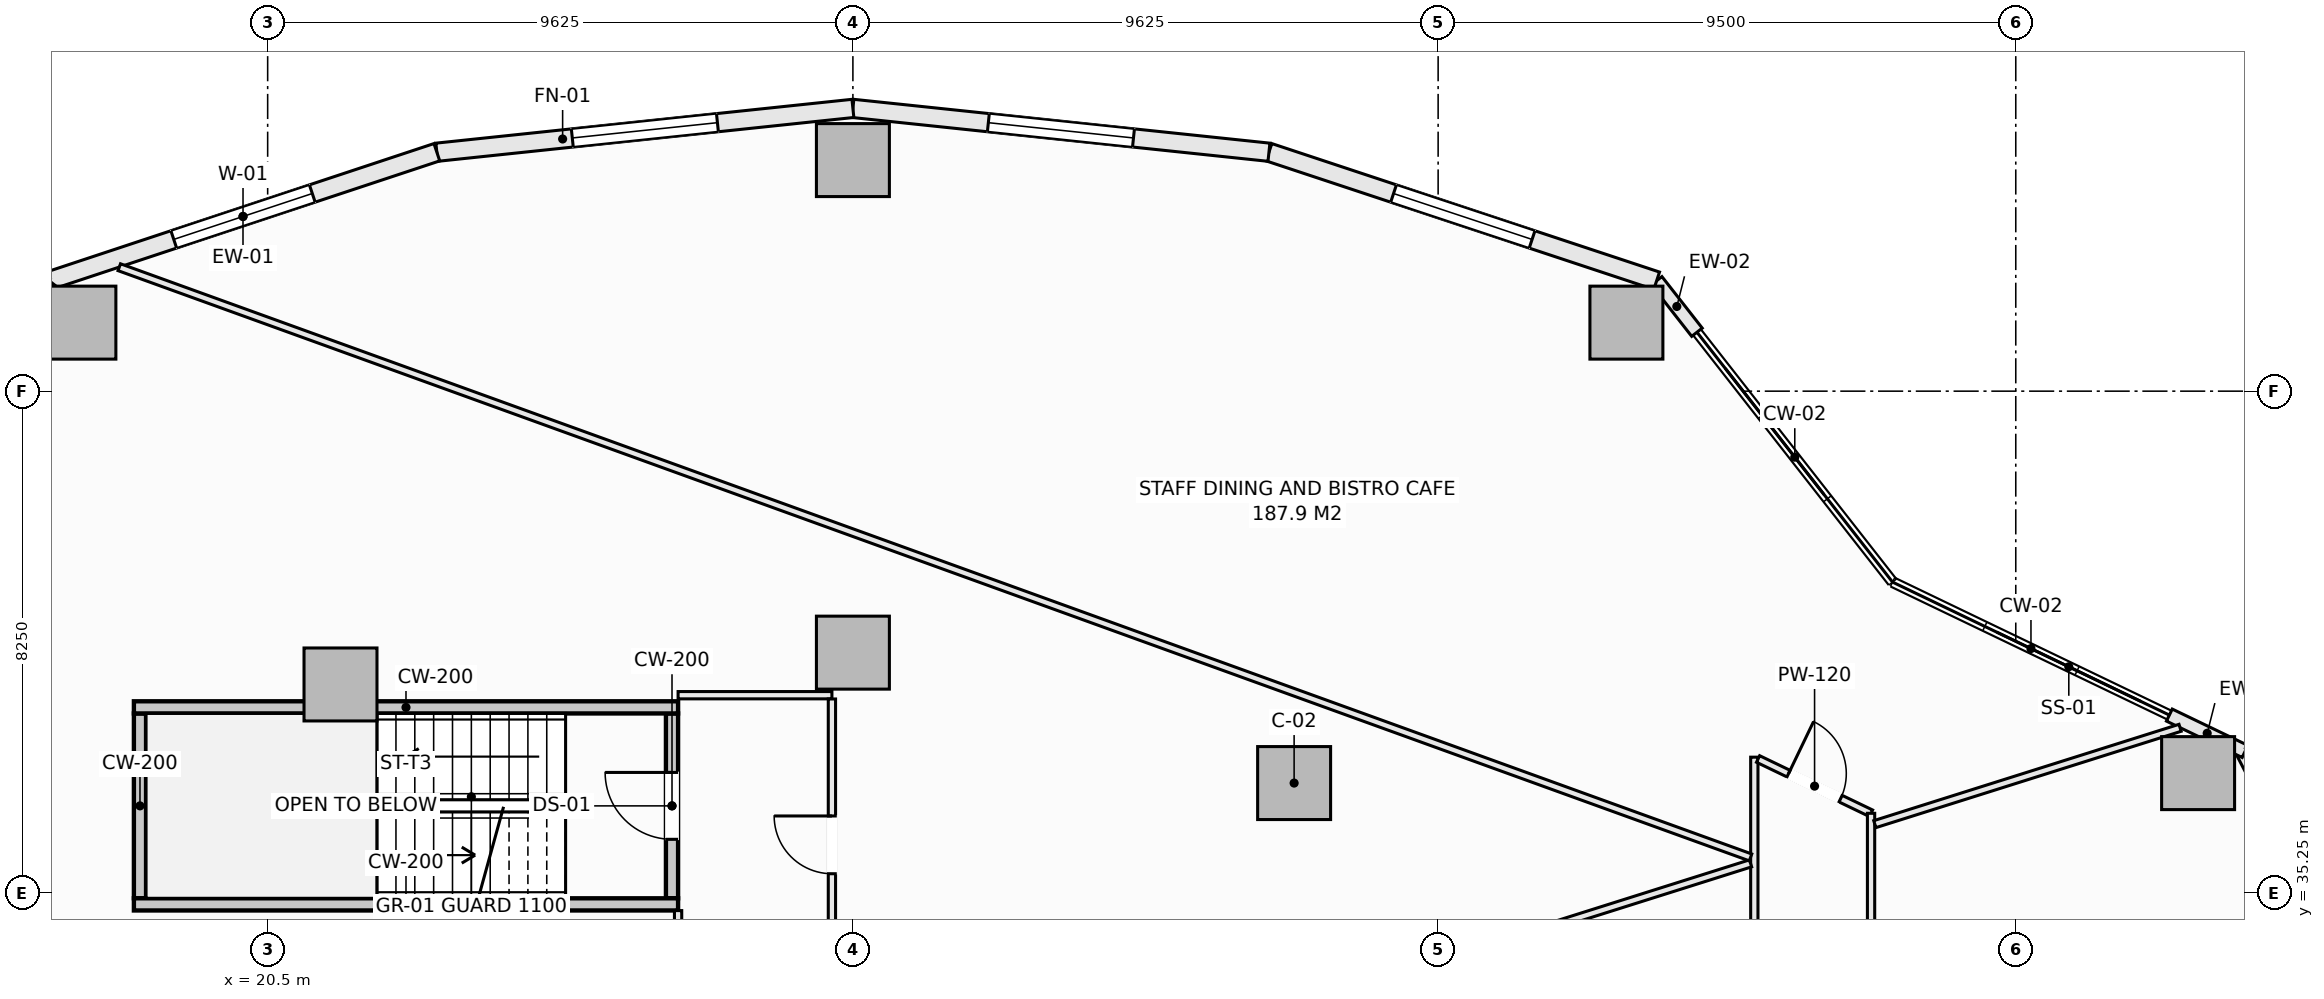
"""IFC4 building model, lengths in metres.
Left out: names, types, materials, properties, quantities, classifications, styles, units other than length and angle.
Written with IfcOpenShell. Run it as: python <this file> out.ifc"""

import sys

from ifc_helpers import new_model, si_unit, direction, frame, frame_2d, origin, origin_2d, place, context, subcontext, project, spatial, rectangle, extrude, element, fill, save


model = new_model("IFC4")
c1 = context("Model", 3, precision=1e-05, world=origin(), true_north=direction((0.0, 1.0)))
c2 = subcontext(c1, "Body", "Model", "MODEL_VIEW")
j1 = project(units=[si_unit("LENGTHUNIT", "METRE"), si_unit("PLANEANGLEUNIT", "RADIAN")], contexts=[c1])
p1 = place(None, origin())
s1 = spatial("IfcSite", under=j1, at=p1, CompositionType="ELEMENT")
p2 = place(p1, origin())
s2 = spatial("IfcBuilding", under=s1, at=p2, CompositionType="ELEMENT")
p3 = place(p2, frame((0.0, 0.0, 76.55)))
s3 = spatial("IfcBuildingStorey", under=s2, at=p3, CompositionType="ELEMENT", Elevation=76.55)
for number, where, z_axis, x_axis in (
    (1, (52.249, 37.219, -0.28), (0.0, 0.0, 1.0), (1.0, 0.0, 0.0)),
    (2, (42.846, 44.627, -0.28), (0.0, 0.0, 1.0), (1.0, 0.0, 0.0)),
    (3, (30.125, 47.3, -0.28), (0.0, 0.0, 1.0), (1.0, 0.0, 0.0)),
    (4, (17.404, 44.627, -0.28), (0.0, 0.0, 1.0), (1.0, 0.0, 0.0)),
    (5, (37.382, 37.055, -0.28), (0.0, 0.0, 1.0), (1.0, 0.0, 0.0)),
    (6, (30.125, 39.2, -0.28), (0.0, 0.0, 1.0), (1.0, 0.0, 0.0)),
    (7, (21.698, 38.677, -0.28), (0.0, 0.0, 1.0), (1.0, 0.0, 0.0)),
):
    element("IfcColumn", number, at=place(p3, frame(where, z_axis=z_axis, x_axis=x_axis)), inside=s3, PredefinedType="COLUMN", context=c2, shape_type="SweptSolid", body=[
        extrude(rectangle(XDim=1.2, YDim=1.2, at=origin_2d()), origin(), (0.0, 0.0, 1.0), 3.85),
    ])
p4 = place(p3, frame((53.021, 37.575, 0.0), z_axis=(0.0, 0.0, 1.0), x_axis=(0.459800981414, -0.888021991558, 0.0)))
e8 = element("IfcWall", 8, at=p4, inside=s3, PredefinedType="SOLIDWALL", context=c2, shape_type="SweptSolid", body=[
    extrude(rectangle(XDim=5.744, YDim=0.3, at=frame_2d((2.872, 0.0))), origin(), (0.0, 0.0, 1.0), 3.093),
])
p5 = place(p4, frame((1.672, 0.0, 0.85)))
e9 = element("IfcOpeningElement", 9, at=p5, cuts=e8, PredefinedType="OPENING", context=c2, shape_type="SweptSolid", body=[
    extrude(rectangle(XDim=2.4, YDim=1.9, at=frame_2d((1.2, 0.95))), frame((0.0, 0.16, 0.0), z_axis=(0.0, -1.0, 0.0), x_axis=(1.0, 0.0, 0.0)), (0.0, 0.0, 1.0), 0.32),
])
p6 = place(p3, frame((51.776, 38.173, 0.0), z_axis=(0.0, 0.0, 1.0), x_axis=(0.90131879969, -0.433156347438, 0.0)))
e10 = element("IfcWall", 10, at=p6, inside=s3, PredefinedType="SOLIDWALL", context=c2, shape_type="SweptSolid", body=[
    extrude(rectangle(XDim=1.381, YDim=0.22, at=frame_2d((0.69, 0.0))), origin(), (0.0, 0.0, 1.0), 3.093),
])
p7 = place(p3, frame((43.344, 45.316, 0.0), z_axis=(0.0, 0.0, 1.0), x_axis=(0.616387780378, -0.787442762492, 0.0)))
e11 = element("IfcWall", 11, at=p7, inside=s3, PredefinedType="SOLIDWALL", context=c2, shape_type="SweptSolid", body=[
    extrude(rectangle(XDim=1.076, YDim=0.22, at=frame_2d((0.538, 0.0))), origin(), (0.0, 0.0, 1.0), 3.093),
])
p8 = place(p3, frame((36.968, 47.429, 0.0), z_axis=(0.0, 0.0, 1.0), x_axis=(0.949245153629, -0.314537181127, 0.0)))
e12 = element("IfcWall", 12, at=p8, inside=s3, PredefinedType="SOLIDWALL", context=c2, shape_type="SweptSolid", body=[
    extrude(rectangle(XDim=6.717, YDim=0.3, at=frame_2d((3.358, 0.0))), origin(), (0.0, 0.0, 1.0), 3.093),
])
p9 = place(p8, frame((2.159, 0.0, 0.85)))
e13 = element("IfcOpeningElement", 13, at=p9, cuts=e12, PredefinedType="OPENING", context=c2, shape_type="SweptSolid", body=[
    extrude(rectangle(XDim=2.4, YDim=1.9, at=frame_2d((1.2, 0.95))), frame((0.0, 0.16, 0.0), z_axis=(0.0, -1.0, 0.0), x_axis=(1.0, 0.0, 0.0)), (0.0, 0.0, 1.0), 0.32),
])
p10 = place(p3, frame((30.125, 48.15, 0.0), z_axis=(0.0, 0.0, 1.0), x_axis=(0.994498840295, -0.104747585419, 0.0)))
e14 = element("IfcWall", 14, at=p10, inside=s3, PredefinedType="SOLIDWALL", context=c2, shape_type="SweptSolid", body=[
    extrude(rectangle(XDim=6.88, YDim=0.3, at=frame_2d((3.44, 0.0))), origin(), (0.0, 0.0, 1.0), 3.093),
])
p11 = place(p10, frame((2.24, 0.0, 0.85)))
e15 = element("IfcOpeningElement", 15, at=p11, cuts=e14, PredefinedType="OPENING", context=c2, shape_type="SweptSolid", body=[
    extrude(rectangle(XDim=2.4, YDim=1.9, at=frame_2d((1.2, 0.95))), frame((0.0, 0.16, 0.0), z_axis=(0.0, -1.0, 0.0), x_axis=(1.0, 0.0, 0.0)), (0.0, 0.0, 1.0), 0.32),
])
p12 = place(p3, frame((23.282, 47.429, 0.0), z_axis=(0.0, 0.0, 1.0), x_axis=(0.994498840295, 0.104747585419, 0.0)))
e16 = element("IfcWall", 16, at=p12, inside=s3, PredefinedType="SOLIDWALL", context=c2, shape_type="SweptSolid", body=[
    extrude(rectangle(XDim=6.88, YDim=0.3, at=frame_2d((3.44, 0.0))), origin(), (0.0, 0.0, 1.0), 3.093),
])
p13 = place(p12, frame((2.24, 0.0, 0.85)))
e17 = element("IfcOpeningElement", 17, at=p13, cuts=e16, PredefinedType="OPENING", context=c2, shape_type="SweptSolid", body=[
    extrude(rectangle(XDim=2.4, YDim=1.9, at=frame_2d((1.2, 0.95))), frame((0.0, 0.16, 0.0), z_axis=(0.0, -1.0, 0.0), x_axis=(1.0, 0.0, 0.0)), (0.0, 0.0, 1.0), 0.32),
])
p14 = place(p3, frame((16.906, 45.316, 0.0), z_axis=(0.0, 0.0, 1.0), x_axis=(0.949245153629, 0.314537181127, 0.0)))
e18 = element("IfcWall", 18, at=p14, inside=s3, PredefinedType="SOLIDWALL", context=c2, shape_type="SweptSolid", body=[
    extrude(rectangle(XDim=6.717, YDim=0.3, at=frame_2d((3.358, 0.0))), origin(), (0.0, 0.0, 1.0), 3.093),
])
p15 = place(p14, frame((2.159, 0.0, 0.85)))
e19 = element("IfcOpeningElement", 19, at=p15, cuts=e18, PredefinedType="OPENING", context=c2, shape_type="SweptSolid", body=[
    extrude(rectangle(XDim=2.4, YDim=1.9, at=frame_2d((1.2, 0.95))), frame((0.0, 0.16, 0.0), z_axis=(0.0, -1.0, 0.0), x_axis=(1.0, 0.0, 0.0)), (0.0, 0.0, 1.0), 0.32),
])
p16 = place(p3, frame((13.026, 40.36, 0.0), z_axis=(0.0, 0.0, 1.0), x_axis=(0.616434798832, 0.78740595552, 0.0)))
e20 = element("IfcWall", 20, at=p16, inside=s3, PredefinedType="SOLIDWALL", context=c2, shape_type="SweptSolid", body=[
    extrude(rectangle(XDim=6.294, YDim=0.3, at=frame_2d((3.147, 0.0))), origin(), (0.0, 0.0, 1.0), 3.093),
])
p17 = place(p16, frame((1.947, 0.0, 0.85)))
e21 = element("IfcOpeningElement", 21, at=p17, cuts=e20, PredefinedType="OPENING", context=c2, shape_type="SweptSolid", body=[
    extrude(rectangle(XDim=2.4, YDim=1.9, at=frame_2d((1.2, 0.95))), frame((0.0, 0.16, 0.0), z_axis=(0.0, -1.0, 0.0), x_axis=(1.0, 0.0, 0.0)), (0.0, 0.0, 1.0), 0.32),
])
p18 = place(p3, frame((27.15, 35.16, -0.28), z_axis=(0.0, 0.0, 1.0), x_axis=(0.0, 1.0, 0.0)))
e22 = element("IfcWall", 22, at=p18, inside=s3, PredefinedType="SHEAR", context=c2, shape_type="SweptSolid", body=[
    extrude(rectangle(XDim=3.04, YDim=0.2, at=frame_2d((1.52, 0.0))), origin(), (0.0, 0.0, 1.0), 3.85),
])
p19 = place(p18, frame((0.97, 0.0, 0.28)))
e23 = element("IfcOpeningElement", 23, at=p19, cuts=e22, PredefinedType="OPENING", context=c2, shape_type="SweptSolid", body=[
    extrude(rectangle(XDim=1.1, YDim=2.15, at=frame_2d((0.55, 1.075))), frame((0.0, 0.11, 0.0), z_axis=(0.0, -1.0, 0.0), x_axis=(1.0, 0.0, 0.0)), (0.0, 0.0, 1.0), 0.22),
])
p20 = place(p3, frame((18.4, 35.16, -0.28), z_axis=(0.0, 0.0, 1.0), x_axis=(0.0, 1.0, 0.0)))
e24 = element("IfcWall", 24, at=p20, inside=s3, PredefinedType="SHEAR", context=c2, shape_type="SweptSolid", body=[
    extrude(rectangle(XDim=3.04, YDim=0.2, at=frame_2d((1.52, 0.0))), origin(), (0.0, 0.0, 1.0), 3.85),
])
for number, where, z_axis, x_axis in (
    (25, (18.3, 38.3, -0.28), (0.0, 0.0, 1.0), (1.0, 0.0, 0.0)),
    (26, (18.3, 35.06, -0.28), (0.0, 0.0, 1.0), (1.0, 0.0, 0.0)),
):
    element("IfcWall", number, at=place(p3, frame(where, z_axis=z_axis, x_axis=x_axis)), inside=s3, PredefinedType="SHEAR", context=c2, shape_type="SweptSolid", body=[
        extrude(rectangle(XDim=8.95, YDim=0.2, at=frame_2d((4.475, 0.0))), origin(), (0.0, 0.0, 1.0), 3.85),
    ])
p21 = place(p3, frame((27.25, 34.352, 0.0), z_axis=(0.0, 0.0, 1.0), x_axis=(0.0, 1.0, 0.0)))
e27 = element("IfcWall", 27, at=p21, inside=s3, PredefinedType="PARTITIONING", context=c2, shape_type="SweptSolid", body=[
    extrude(rectangle(XDim=0.606, YDim=0.12, at=frame_2d((0.303, 0.0))), origin(), (0.0, 0.0, 1.0), 3.57),
])
p22 = place(p3, frame((27.25, 38.5, 0.0), z_axis=(0.0, 0.0, 1.0), x_axis=(1.0, 0.0, 0.0)))
e28 = element("IfcWall", 28, at=p22, inside=s3, PredefinedType="PARTITIONING", context=c2, shape_type="SweptSolid", body=[
    extrude(rectangle(XDim=2.53, YDim=0.12, at=frame_2d((1.265, 0.0))), origin(), (0.0, 0.0, 1.0), 3.57),
])
p23 = place(p3, frame((29.78, 33.64, 0.0), z_axis=(0.0, 0.0, 1.0), x_axis=(0.0, 1.0, 0.0)))
e29 = element("IfcWall", 29, at=p23, inside=s3, PredefinedType="PARTITIONING", context=c2, shape_type="SweptSolid", body=[
    extrude(rectangle(XDim=4.798, YDim=0.12, at=frame_2d((2.399, 0.0))), origin(), (0.0, 0.0, 1.0), 3.57),
])
p24 = place(p23, frame((1.924, 0.0, 0.0)))
e30 = element("IfcOpeningElement", 30, at=p24, cuts=e29, PredefinedType="OPENING", context=c2, shape_type="SweptSolid", body=[
    extrude(rectangle(XDim=0.95, YDim=2.1, at=frame_2d((0.475, 1.05))), frame((0.0, 0.07, 0.0), z_axis=(0.0, -1.0, 0.0), x_axis=(1.0, 0.0, 0.0)), (0.0, 0.0, 1.0), 0.14),
])
p25 = place(p3, frame((44.95, 31.182, 0.0), z_axis=(0.0, 0.0, 1.0), x_axis=(0.0, 1.0, 0.0)))
e31 = element("IfcWall", 31, at=p25, inside=s3, PredefinedType="PARTITIONING", context=c2, shape_type="SweptSolid", body=[
    extrude(rectangle(XDim=6.299, YDim=0.12, at=frame_2d((3.149, 0.0))), origin(), (0.0, 0.0, 1.0), 3.57),
])
p26 = place(p3, frame((45.012, 37.451, 0.0), z_axis=(0.0, 0.0, 1.0), x_axis=(0.901304887575, -0.433185294803, 0.0)))
e32 = element("IfcWall", 32, at=p26, inside=s3, PredefinedType="PARTITIONING", context=c2, shape_type="SweptSolid", body=[
    extrude(rectangle(XDim=2.062, YDim=0.12, at=frame_2d((1.031, 0.0))), origin(), (0.0, 0.0, 1.0), 3.57),
])
p27 = place(p26, frame((0.556, 0.0, 0.0)))
e33 = element("IfcOpeningElement", 33, at=p27, cuts=e32, PredefinedType="OPENING", context=c2, shape_type="SweptSolid", body=[
    extrude(rectangle(XDim=0.95, YDim=2.1, at=frame_2d((0.475, 1.05))), frame((0.0, 0.07, 0.0), z_axis=(0.0, -1.0, 0.0), x_axis=(1.0, 0.0, 0.0)), (0.0, 0.0, 1.0), 0.14),
])
p28 = place(p3, frame((46.87, 17.442, 0.0), z_axis=(0.0, 0.0, 1.0), x_axis=(0.0, 1.0, 0.0)))
e34 = element("IfcWall", 34, at=p28, inside=s3, PredefinedType="PARTITIONING", context=c2, shape_type="SweptSolid", body=[
    extrude(rectangle(XDim=19.116, YDim=0.12, at=frame_2d((9.558, 0.0))), origin(), (0.0, 0.0, 1.0), 3.57),
])
p29 = place(p28, frame((11.352, 0.0, 0.0)))
e35 = element("IfcOpeningElement", 35, at=p29, cuts=e34, PredefinedType="OPENING", context=c2, shape_type="SweptSolid", body=[
    extrude(rectangle(XDim=0.95, YDim=2.1, at=frame_2d((0.475, 1.05))), frame((0.0, 0.07, 0.0), z_axis=(0.0, -1.0, 0.0), x_axis=(1.0, 0.0, 0.0)), (0.0, 0.0, 1.0), 0.14),
])
p30 = place(p3, frame((39.02, 33.883, 0.0), z_axis=(0.0, 0.0, 1.0), x_axis=(0.953639615223, 0.300950966568, 0.0)))
e36 = element("IfcWall", 36, at=p30, inside=s3, PredefinedType="PARTITIONING", context=c2, shape_type="SweptSolid", body=[
    extrude(rectangle(XDim=6.153, YDim=0.12, at=frame_2d((3.077, 0.0))), origin(), (0.0, 0.0, 1.0), 3.57),
])
p31 = place(p3, frame((46.932, 36.38, 0.0), z_axis=(0.0, 0.0, 1.0), x_axis=(0.95364782426, 0.300924952909, 0.0)))
e37 = element("IfcWall", 37, at=p31, inside=s3, PredefinedType="PARTITIONING", context=c2, shape_type="SweptSolid", body=[
    extrude(rectangle(XDim=5.265, YDim=0.12, at=frame_2d((2.632, 0.0))), origin(), (0.0, 0.0, 1.0), 3.57),
])
p32 = place(p3, frame((18.06, 45.538, 0.0), z_axis=(0.0, 0.0, 1.0), x_axis=(0.940354559933, -0.340195975304, 0.0)))
e38 = element("IfcWall", 38, at=p32, inside=s3, PredefinedType="PARTITIONING", context=c2, shape_type="SweptSolid", body=[
    extrude(rectangle(XDim=28.53, YDim=0.12, at=frame_2d((14.265, 0.0))), origin(), (0.0, 0.0, 1.0), 3.093),
])
p33 = place(p3, frame((24.626, 34.958, 0.0), z_axis=(0.0, 0.0, 1.0), x_axis=(0.643032873298, -0.765838575588, 0.0)))
e39 = element("IfcWall", 39, at=p33, inside=s3, PredefinedType="PARTITIONING", context=c2, shape_type="SweptSolid", body=[
    extrude(rectangle(XDim=0.791, YDim=0.12, at=frame_2d((0.396, 0.0))), origin(), (0.0, 0.0, 1.0), 3.57),
])
p34 = place(p9, origin())
e40 = element("IfcWindow", 40, at=p34, inside=s3, PartitioningType="SINGLE_PANEL", PredefinedType="WINDOW", context=c2, shape_type="SweptSolid", body=[
    extrude(rectangle(XDim=2.4, YDim=1.9, at=frame_2d((1.2, 0.95))), frame((0.0, 0.03, 0.0), z_axis=(0.0, -1.0, 0.0), x_axis=(1.0, 0.0, 0.0)), (0.0, 0.0, 1.0), 0.06),
])
fill(e13, e40)
p35 = place(p11, origin())
e41 = element("IfcWindow", 41, at=p35, inside=s3, PartitioningType="SINGLE_PANEL", PredefinedType="WINDOW", context=c2, shape_type="SweptSolid", body=[
    extrude(rectangle(XDim=2.4, YDim=1.9, at=frame_2d((1.2, 0.95))), frame((0.0, 0.03, 0.0), z_axis=(0.0, -1.0, 0.0), x_axis=(1.0, 0.0, 0.0)), (0.0, 0.0, 1.0), 0.06),
])
fill(e15, e41)
p36 = place(p13, origin())
e42 = element("IfcWindow", 42, at=p36, inside=s3, PartitioningType="SINGLE_PANEL", PredefinedType="WINDOW", context=c2, shape_type="SweptSolid", body=[
    extrude(rectangle(XDim=2.4, YDim=1.9, at=frame_2d((1.2, 0.95))), frame((0.0, 0.03, 0.0), z_axis=(0.0, -1.0, 0.0), x_axis=(1.0, 0.0, 0.0)), (0.0, 0.0, 1.0), 0.06),
])
fill(e17, e42)
p37 = place(p15, origin())
e43 = element("IfcWindow", 43, at=p37, inside=s3, PartitioningType="SINGLE_PANEL", PredefinedType="WINDOW", context=c2, shape_type="SweptSolid", body=[
    extrude(rectangle(XDim=2.4, YDim=1.9, at=frame_2d((1.2, 0.95))), frame((0.0, 0.03, 0.0), z_axis=(0.0, -1.0, 0.0), x_axis=(1.0, 0.0, 0.0)), (0.0, 0.0, 1.0), 0.06),
])
fill(e19, e43)
p38 = place(p19, origin())
e44 = element("IfcDoor", 44, at=p38, inside=s3, OperationType="SINGLE_SWING_RIGHT", PredefinedType="DOOR", context=c2, shape_type="SweptSolid", body=[
    extrude(rectangle(XDim=1.1, YDim=2.15, at=frame_2d((0.55, 1.075))), frame((0.0, 0.025, 0.0), z_axis=(0.0, -1.0, 0.0), x_axis=(1.0, 0.0, 0.0)), (0.0, 0.0, 1.0), 0.05),
])
fill(e23, e44)
p39 = place(p27, origin())
e45 = element("IfcDoor", 45, at=p39, inside=s3, OperationType="SINGLE_SWING_LEFT", PredefinedType="DOOR", context=c2, shape_type="SweptSolid", body=[
    extrude(rectangle(XDim=0.95, YDim=2.1, at=frame_2d((0.475, 1.05))), frame((0.0, 0.025, 0.0), z_axis=(0.0, -1.0, 0.0), x_axis=(1.0, 0.0, 0.0)), (0.0, 0.0, 1.0), 0.05),
])
fill(e33, e45)
p40 = place(p24, origin())
e46 = element("IfcDoor", 46, at=p40, inside=s3, OperationType="SINGLE_SWING_RIGHT", PredefinedType="DOOR", context=c2, shape_type="SweptSolid", body=[
    extrude(rectangle(XDim=0.95, YDim=2.1, at=frame_2d((0.475, 1.05))), frame((0.0, 0.025, 0.0), z_axis=(0.0, -1.0, 0.0), x_axis=(1.0, 0.0, 0.0)), (0.0, 0.0, 1.0), 0.05),
])
fill(e30, e46)
save(model, sys.argv[1])
